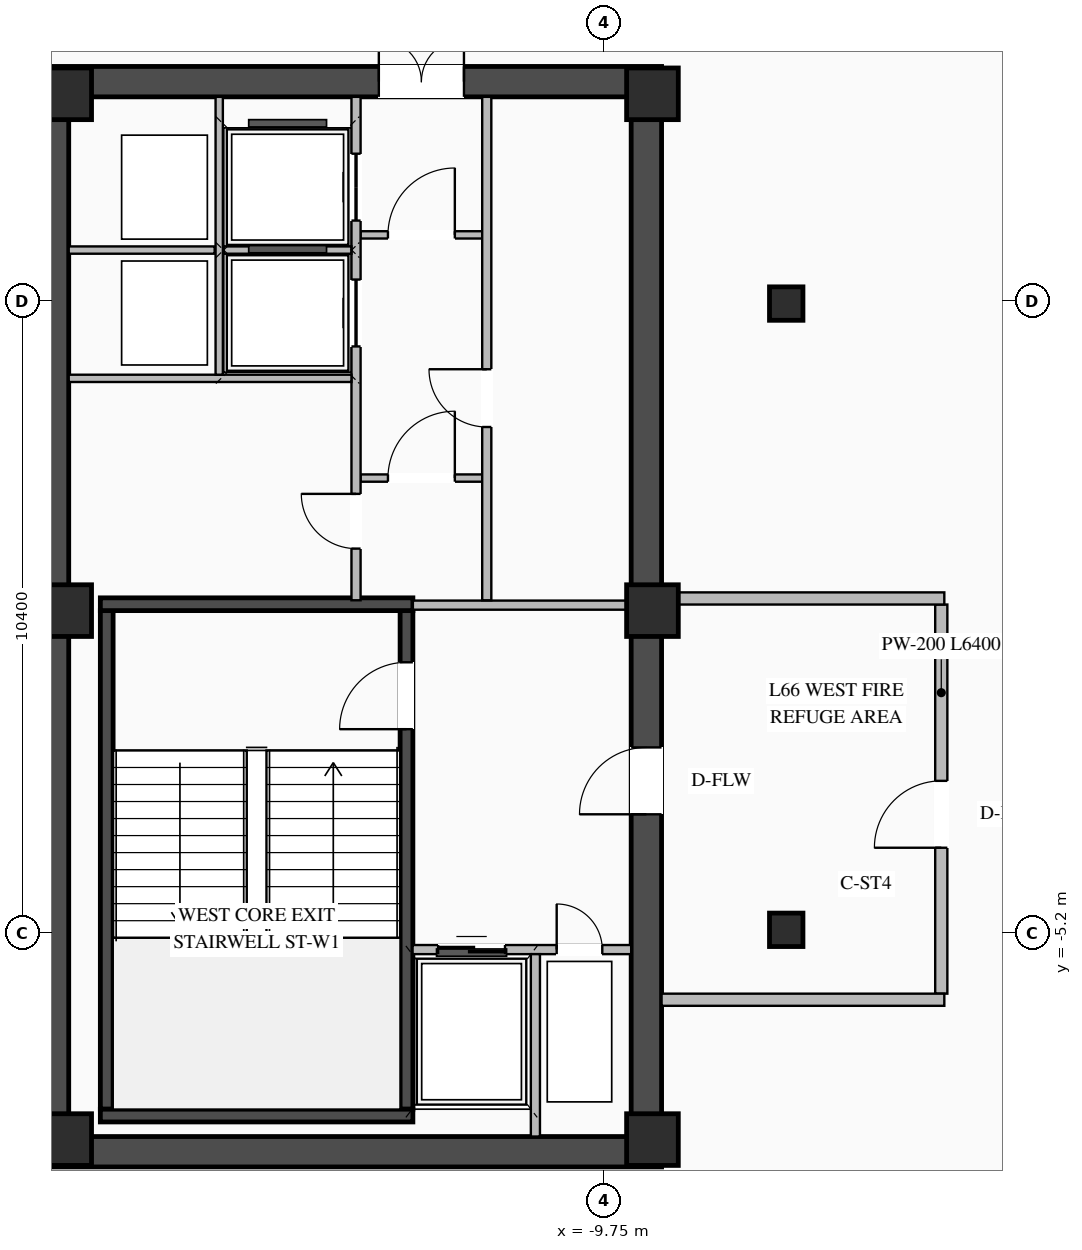
"""IFC4 building model, lengths in metres.
Left out: names, types, materials, properties, quantities, classifications, styles, units other than length and angle.
Written with IfcOpenShell. Run it as: python <this file> out.ifc"""

import sys

from ifc_helpers import new_model, si_unit, direction, frame, frame_2d, origin, origin_2d, place, context, subcontext, project, spatial, rectangle, i_section, extrude, element, fill, save


model = new_model("IFC4")
c1 = context("Model", 3, precision=1e-05, world=origin(), true_north=direction((0.0, 1.0)))
c2 = subcontext(c1, "Body", "Model", "MODEL_VIEW")
j1 = project(units=[si_unit("LENGTHUNIT", "METRE"), si_unit("PLANEANGLEUNIT", "RADIAN")], contexts=[c1])
p1 = place(None, origin())
s1 = spatial("IfcSite", under=j1, at=p1, CompositionType="ELEMENT")
p2 = place(p1, origin())
s2 = spatial("IfcBuilding", under=s1, at=p2, CompositionType="ELEMENT")
p3 = place(p2, frame((0.0, 0.0, 243.0)))
s3 = spatial("IfcBuildingStorey", under=s2, at=p3, CompositionType="ELEMENT", Elevation=243.0)
p4 = place(p3, frame((-19.05, -8.8, 0.0), z_axis=(0.0, 0.0, 1.0), x_axis=(1.0, 0.0, 0.0)))
e1 = element("IfcWall", 1, at=p4, inside=s3, PredefinedType="SHEAR", context=c2, shape_type="SweptSolid", body=[
    extrude(rectangle(XDim=10.25, YDim=0.5, at=frame_2d((5.125, 0.0))), origin(), (0.0, 0.0, 1.0), 4.22),
])
p5 = place(p3, frame((-19.05, 8.8, 0.0), z_axis=(0.0, 0.0, 1.0), x_axis=(1.0, 0.0, 0.0)))
e2 = element("IfcWall", 2, at=p5, inside=s3, PredefinedType="SHEAR", context=c2, shape_type="SweptSolid", body=[
    extrude(rectangle(XDim=10.25, YDim=0.5, at=frame_2d((5.125, 0.0))), origin(), (0.0, 0.0, 1.0), 4.22),
])
p6 = place(p5, frame((5.6, 0.0, 0.0)))
e3 = element("IfcOpeningElement", 3, at=p6, cuts=e2, PredefinedType="OPENING", context=c2, shape_type="SweptSolid", body=[
    extrude(rectangle(XDim=1.4, YDim=2.05, at=frame_2d((0.7, 1.025))), frame((0.0, 0.26, 0.0), z_axis=(0.0, -1.0, 0.0), x_axis=(1.0, 0.0, 0.0)), (0.0, 0.0, 1.0), 0.52),
])
p7 = place(p3, frame((-18.8, -8.55, 0.0), z_axis=(0.0, 0.0, 1.0), x_axis=(0.0, 1.0, 0.0)))
e4 = element("IfcWall", 4, at=p7, inside=s3, PredefinedType="SHEAR", context=c2, shape_type="SweptSolid", body=[
    extrude(rectangle(XDim=17.1, YDim=0.5, at=frame_2d((8.55, 0.0))), origin(), (0.0, 0.0, 1.0), 4.22),
])
p8 = place(p3, frame((-9.05, -8.55, 0.0), z_axis=(0.0, 0.0, 1.0), x_axis=(0.0, 1.0, 0.0)))
e5 = element("IfcWall", 5, at=p8, inside=s3, PredefinedType="SHEAR", context=c2, shape_type="SweptSolid", body=[
    extrude(rectangle(XDim=17.1, YDim=0.5, at=frame_2d((8.55, 0.0))), origin(), (0.0, 0.0, 1.0), 4.22),
])
p9 = place(p8, frame((5.3, 0.0, 0.0)))
e6 = element("IfcOpeningElement", 6, at=p9, cuts=e5, PredefinedType="OPENING", context=c2, shape_type="SweptSolid", body=[
    extrude(rectangle(XDim=1.1, YDim=2.08, at=frame_2d((0.55, 1.04))), frame((0.0, 0.26, 0.0), z_axis=(0.0, -1.0, 0.0), x_axis=(1.0, 0.0, 0.0)), (0.0, 0.0, 1.0), 0.52),
])
p10 = place(p3, frame((-12.995, -8.1, 0.0), z_axis=(0.0, 0.0, 1.0), x_axis=(0.0, 1.0, 0.0)))
e7 = element("IfcWall", 7, at=p10, inside=s3, PredefinedType="SHEAR", context=c2, shape_type="SweptSolid", body=[
    extrude(rectangle(XDim=8.2, YDim=0.21, at=frame_2d((4.1, 0.0))), origin(), (0.0, 0.0, 1.0), 4.22),
])
p11 = place(p10, frame((6.25, 0.0, 0.0)))
e8 = element("IfcOpeningElement", 8, at=p11, cuts=e7, PredefinedType="OPENING", context=c2, shape_type="SweptSolid", body=[
    extrude(rectangle(XDim=1.1, YDim=2.15, at=frame_2d((0.55, 1.075))), frame((0.0, 0.115, 0.0), z_axis=(0.0, -1.0, 0.0), x_axis=(1.0, 0.0, 0.0)), (0.0, 0.0, 1.0), 0.23),
])
p12 = place(p3, frame((-17.925, -8.1, 0.0), z_axis=(0.0, 0.0, 1.0), x_axis=(0.0, 1.0, 0.0)))
e9 = element("IfcWall", 9, at=p12, inside=s3, PredefinedType="SHEAR", context=c2, shape_type="SweptSolid", body=[
    extrude(rectangle(XDim=8.2, YDim=0.21, at=frame_2d((4.1, 0.0))), origin(), (0.0, 0.0, 1.0), 4.22),
])
for number, where, z_axis, x_axis in (
    (10, (-18.03, -8.205, 0.0), (0.0, 0.0, 1.0), (1.0, 0.0, 0.0)),
    (11, (-12.89, 0.205, 0.0), (0.0, 0.0, 1.0), (-1.0, 0.0, 0.0)),
):
    element("IfcWall", number, at=place(p3, frame(where, z_axis=z_axis, x_axis=x_axis)), inside=s3, PredefinedType="SHEAR", context=c2, shape_type="SweptSolid", body=[
        extrude(rectangle(XDim=5.14, YDim=0.21, at=frame_2d((2.57, 0.0))), origin(), (0.0, 0.0, 1.0), 4.22),
    ])
for number, where, z_axis, x_axis in (
    (12, (-8.95, -8.6, 0.0), (0.0, 0.0, 1.0), (1.0, 0.0, 0.0)),
    (13, (-8.95, 0.1, 0.0), (0.0, 0.0, 1.0), (1.0, 0.0, 0.0)),
    (14, (-8.95, 8.6, 0.0), (0.0, 0.0, 1.0), (1.0, 0.0, 0.0)),
    (15, (-18.6, -8.6, 0.0), (0.0, 0.0, 1.0), (1.0, 0.0, 0.0)),
    (16, (-18.6, 0.1, 0.0), (0.0, 0.0, 1.0), (1.0, 0.0, 0.0)),
    (17, (-18.6, 8.6, 0.0), (0.0, 0.0, 1.0), (1.0, 0.0, 0.0)),
):
    element("IfcColumn", number, at=place(p3, frame(where, z_axis=z_axis, x_axis=x_axis)), inside=s3, PredefinedType="COLUMN", context=c2, shape_type="SweptSolid", body=[
        extrude(rectangle(XDim=0.85, YDim=0.85, at=origin_2d()), origin(), (0.0, 0.0, 1.0), 4.5),
    ])
for number, where, z_axis, x_axis in (
    (18, (-6.75, -5.15, 0.0), (0.0, 0.0, 1.0), (1.0, 0.0, 0.0)),
    (19, (-6.75, 5.15, 0.0), (0.0, 0.0, 1.0), (1.0, 0.0, 0.0)),
):
    element("IfcColumn", number, at=place(p3, frame(where, z_axis=z_axis, x_axis=x_axis)), inside=s3, PredefinedType="COLUMN", context=c2, shape_type="SweptSolid", body=[
        extrude(i_section(OverallWidth=0.55, OverallDepth=0.55, WebThickness=0.024, FlangeThickness=0.036, at=origin_2d()), origin(), (0.0, 0.0, 1.0), 4.5),
    ])
p13 = place(p3, frame((-12.895, -5.475, 0.0), z_axis=(0.0, 0.0, 1.0), x_axis=(1.0, 0.0, 0.0)))
e20 = element("IfcWall", 20, at=p13, inside=s3, PredefinedType="STANDARD", context=c2, shape_type="SweptSolid", body=[
    extrude(rectangle(XDim=3.595, YDim=0.15, at=frame_2d((1.797, 0.0))), origin(), (0.0, 0.0, 1.0), 4.2),
])
p14 = place(p13, frame((0.42, 0.0, 0.0)))
e21 = element("IfcOpeningElement", 21, at=p14, cuts=e20, PredefinedType="OPENING", context=c2, shape_type="SweptSolid", body=[
    extrude(rectangle(XDim=1.1, YDim=2.15, at=frame_2d((0.55, 1.075))), frame((0.0, 0.085, 0.0), z_axis=(0.0, -1.0, 0.0), x_axis=(1.0, 0.0, 0.0)), (0.0, 0.0, 1.0), 0.17),
])
p15 = place(p13, frame((2.37, 0.0, 0.0)))
e22 = element("IfcOpeningElement", 22, at=p15, cuts=e20, PredefinedType="OPENING", context=c2, shape_type="SweptSolid", body=[
    extrude(rectangle(XDim=0.75, YDim=2.05, at=frame_2d((0.375, 1.025))), frame((0.0, 0.085, 0.0), z_axis=(0.0, -1.0, 0.0), x_axis=(1.0, 0.0, 0.0)), (0.0, 0.0, 1.0), 0.17),
])
p16 = place(p3, frame((-10.875, -8.55, 0.0), z_axis=(0.0, 0.0, 1.0), x_axis=(0.0, 1.0, 0.0)))
e23 = element("IfcWall", 23, at=p16, inside=s3, PredefinedType="STANDARD", context=c2, shape_type="SweptSolid", body=[
    extrude(rectangle(XDim=3.0, YDim=0.15, at=frame_2d((1.5, 0.0))), origin(), (0.0, 0.0, 1.0), 4.2),
])
p17 = place(p3, frame((-12.89, 0.19, 0.0), z_axis=(0.0, 0.0, 1.0), x_axis=(1.0, 0.0, 0.0)))
e24 = element("IfcWall", 24, at=p17, inside=s3, PredefinedType="STANDARD", context=c2, shape_type="SweptSolid", body=[
    extrude(rectangle(XDim=3.59, YDim=0.15, at=frame_2d((1.795, 0.0))), origin(), (0.0, 0.0, 1.0), 3.595),
])
p18 = place(p3, frame((-13.75, 2.28, 0.0), z_axis=(0.0, 0.0, 1.0), x_axis=(1.0, 0.0, 0.0)))
e25 = element("IfcWall", 25, at=p18, inside=s3, PredefinedType="STANDARD", context=c2, shape_type="SweptSolid", body=[
    extrude(rectangle(XDim=2.0, YDim=0.12, at=frame_2d((1.0, 0.0))), origin(), (0.0, 0.0, 1.0), 4.2),
])
p19 = place(p18, frame((0.45, 0.0, 0.0)))
e26 = element("IfcOpeningElement", 26, at=p19, cuts=e25, PredefinedType="OPENING", context=c2, shape_type="SweptSolid", body=[
    extrude(rectangle(XDim=1.1, YDim=2.1, at=frame_2d((0.55, 1.05))), frame((0.0, 0.07, 0.0), z_axis=(0.0, -1.0, 0.0), x_axis=(1.0, 0.0, 0.0)), (0.0, 0.0, 1.0), 0.14),
])
p20 = place(p3, frame((-13.75, 6.28, 0.0), z_axis=(0.0, 0.0, 1.0), x_axis=(1.0, 0.0, 0.0)))
e27 = element("IfcWall", 27, at=p20, inside=s3, PredefinedType="STANDARD", context=c2, shape_type="SweptSolid", body=[
    extrude(rectangle(XDim=2.0, YDim=0.12, at=frame_2d((1.0, 0.0))), origin(), (0.0, 0.0, 1.0), 4.2),
])
p21 = place(p20, frame((0.45, 0.0, 0.0)))
e28 = element("IfcOpeningElement", 28, at=p21, cuts=e27, PredefinedType="OPENING", context=c2, shape_type="SweptSolid", body=[
    extrude(rectangle(XDim=1.1, YDim=2.1, at=frame_2d((0.55, 1.05))), frame((0.0, 0.07, 0.0), z_axis=(0.0, -1.0, 0.0), x_axis=(1.0, 0.0, 0.0)), (0.0, 0.0, 1.0), 0.14),
])
p22 = place(p3, frame((-11.675, 0.27, 0.0), z_axis=(0.0, 0.0, 1.0), x_axis=(0.0, 1.0, 0.0)))
e29 = element("IfcWall", 29, at=p22, inside=s3, PredefinedType="STANDARD", context=c2, shape_type="SweptSolid", body=[
    extrude(rectangle(XDim=8.28, YDim=0.15, at=frame_2d((4.14, 0.0))), origin(), (0.0, 0.0, 1.0), 4.2),
])
p23 = place(p22, frame((2.85, 0.0, 0.0)))
e30 = element("IfcOpeningElement", 30, at=p23, cuts=e29, PredefinedType="OPENING", context=c2, shape_type="SweptSolid", body=[
    extrude(rectangle(XDim=0.95, YDim=2.05, at=frame_2d((0.475, 1.025))), frame((0.0, 0.085, 0.0), z_axis=(0.0, -1.0, 0.0), x_axis=(1.0, 0.0, 0.0)), (0.0, 0.0, 1.0), 0.17),
])
p24 = place(p3, frame((-13.825, 0.27, 0.0), z_axis=(0.0, 0.0, 1.0), x_axis=(0.0, 1.0, 0.0)))
e31 = element("IfcWall", 31, at=p24, inside=s3, PredefinedType="STANDARD", context=c2, shape_type="SweptSolid", body=[
    extrude(rectangle(XDim=8.28, YDim=0.15, at=frame_2d((4.14, 0.0))), origin(), (0.0, 0.0, 1.0), 4.2),
])
p25 = place(p24, frame((4.175, 0.0, 0.0)))
e32 = element("IfcOpeningElement", 32, at=p25, cuts=e31, PredefinedType="OPENING", context=c2, shape_type="SweptSolid", body=[
    extrude(rectangle(XDim=1.1, YDim=2.1, at=frame_2d((0.55, 1.05))), frame((0.0, 0.085, 0.0), z_axis=(0.0, -1.0, 0.0), x_axis=(1.0, 0.0, 0.0)), (0.0, 0.0, 1.0), 0.17),
])
p26 = place(p24, frame((6.245, 0.0, 0.0)))
e33 = element("IfcOpeningElement", 33, at=p26, cuts=e31, PredefinedType="OPENING", context=c2, shape_type="SweptSolid", body=[
    extrude(rectangle(XDim=1.1, YDim=2.1, at=frame_2d((0.55, 1.05))), frame((0.0, 0.085, 0.0), z_axis=(0.0, -1.0, 0.0), x_axis=(1.0, 0.0, 0.0)), (0.0, 0.0, 1.0), 0.17),
])
p27 = place(p24, frame((0.85, 0.0, 0.0)))
e34 = element("IfcOpeningElement", 34, at=p27, cuts=e31, PredefinedType="OPENING", context=c2, shape_type="SweptSolid", body=[
    extrude(rectangle(XDim=0.9, YDim=2.05, at=frame_2d((0.45, 1.025))), frame((0.0, 0.085, 0.0), z_axis=(0.0, -1.0, 0.0), x_axis=(1.0, 0.0, 0.0)), (0.0, 0.0, 1.0), 0.17),
])
p28 = place(p3, frame((-18.55, 3.92, 0.0), z_axis=(0.0, 0.0, 1.0), x_axis=(1.0, 0.0, 0.0)))
e35 = element("IfcWall", 35, at=p28, inside=s3, PredefinedType="STANDARD", context=c2, shape_type="SweptSolid", body=[
    extrude(rectangle(XDim=4.65, YDim=0.12, at=frame_2d((2.325, 0.0))), origin(), (0.0, 0.0, 1.0), 4.2),
])
p29 = place(p3, frame((-18.55, 6.03, 0.0), z_axis=(0.0, 0.0, 1.0), x_axis=(1.0, 0.0, 0.0)))
e36 = element("IfcWall", 36, at=p29, inside=s3, PredefinedType="STANDARD", context=c2, shape_type="SweptSolid", body=[
    extrude(rectangle(XDim=2.4, YDim=0.12, at=frame_2d((1.2, 0.0))), origin(), (0.0, 0.0, 1.0), 4.2),
])
p30 = place(p3, frame((-16.075, 3.98, 0.0), z_axis=(0.0, 0.0, 1.0), x_axis=(0.0, 1.0, 0.0)))
e37 = element("IfcWall", 37, at=p30, inside=s3, PredefinedType="STANDARD", context=c2, shape_type="SweptSolid", body=[
    extrude(rectangle(XDim=4.57, YDim=0.12, at=frame_2d((2.285, 0.0))), origin(), (0.0, 0.0, 1.0), 4.2),
])
p31 = place(p3, frame((-16.0, 6.03, 0.0), z_axis=(0.0, 0.0, 1.0), x_axis=(1.0, 0.0, 0.0)))
e38 = element("IfcWall", 38, at=p31, inside=s3, PredefinedType="STANDARD", context=c2, shape_type="SweptSolid", body=[
    extrude(rectangle(XDim=2.1, YDim=0.12, at=frame_2d((1.05, 0.0))), origin(), (0.0, 0.0, 1.0), 4.2),
])
p32 = place(p3, frame((-4.2, -6.2, 0.0), z_axis=(0.0, 0.0, 1.0), x_axis=(0.0, 1.0, 0.0)))
e39 = element("IfcWall", 39, at=p32, inside=s3, PredefinedType="STANDARD", context=c2, shape_type="SweptSolid", body=[
    extrude(rectangle(XDim=6.4, YDim=0.2, at=frame_2d((3.2, 0.0))), origin(), (0.0, 0.0, 1.0), 4.2),
])
p33 = place(p32, frame((2.4, 0.0, 0.0)))
e40 = element("IfcOpeningElement", 40, at=p33, cuts=e39, PredefinedType="OPENING", context=c2, shape_type="SweptSolid", body=[
    extrude(rectangle(XDim=1.1, YDim=2.08, at=frame_2d((0.55, 1.04))), frame((0.0, 0.11, 0.0), z_axis=(0.0, -1.0, 0.0), x_axis=(1.0, 0.0, 0.0)), (0.0, 0.0, 1.0), 0.22),
])
for number, where, z_axis, x_axis in (
    (41, (-8.8, -6.3, 0.0), (0.0, 0.0, 1.0), (1.0, 0.0, 0.0)),
    (42, (-8.8, 0.3, 0.0), (0.0, 0.0, 1.0), (1.0, 0.0, 0.0)),
):
    element("IfcWall", number, at=place(p3, frame(where, z_axis=z_axis, x_axis=x_axis)), inside=s3, PredefinedType="STANDARD", context=c2, shape_type="SweptSolid", body=[
        extrude(rectangle(XDim=4.65, YDim=0.2, at=frame_2d((2.325, 0.0))), origin(), (0.0, 0.0, 1.0), 4.2),
    ])
p34 = place(p11, origin())
e43 = element("IfcDoor", 43, at=p34, inside=s3, OperationType="SINGLE_SWING_LEFT", PredefinedType="DOOR", context=c2, shape_type="SweptSolid", body=[
    extrude(rectangle(XDim=1.1, YDim=2.15, at=frame_2d((0.55, 1.075))), frame((0.0, 0.025, 0.0), z_axis=(0.0, -1.0, 0.0), x_axis=(1.0, 0.0, 0.0)), (0.0, 0.0, 1.0), 0.05),
])
fill(e8, e43)
p35 = place(p14, origin())
e44 = element("IfcDoor", 44, at=p35, inside=s3, OperationType="DOUBLE_DOOR_SLIDING", PredefinedType="DOOR", context=c2, shape_type="SweptSolid", body=[
    extrude(rectangle(XDim=1.1, YDim=2.15, at=frame_2d((0.55, 1.075))), frame((0.0, 0.025, 0.0), z_axis=(0.0, -1.0, 0.0), x_axis=(1.0, 0.0, 0.0)), (0.0, 0.0, 1.0), 0.05),
])
fill(e21, e44)
p36 = place(p15, origin())
e45 = element("IfcDoor", 45, at=p36, inside=s3, OperationType="SINGLE_SWING_LEFT", PredefinedType="DOOR", context=c2, shape_type="SweptSolid", body=[
    extrude(rectangle(XDim=0.75, YDim=2.05, at=frame_2d((0.375, 1.025))), frame((0.0, 0.025, 0.0), z_axis=(0.0, -1.0, 0.0), x_axis=(1.0, 0.0, 0.0)), (0.0, 0.0, 1.0), 0.05),
])
fill(e22, e45)
p37 = place(p9, origin())
e46 = element("IfcDoor", 46, at=p37, inside=s3, OperationType="SINGLE_SWING_LEFT", PredefinedType="DOOR", context=c2, shape_type="SweptSolid", body=[
    extrude(rectangle(XDim=1.1, YDim=2.08, at=frame_2d((0.55, 1.04))), frame((0.0, 0.205, 0.0), z_axis=(0.0, -1.0, 0.0), x_axis=(1.0, 0.0, 0.0)), (0.0, 0.0, 1.0), 0.05),
])
fill(e6, e46)
p38 = place(p19, origin())
e47 = element("IfcDoor", 47, at=p38, inside=s3, OperationType="SINGLE_SWING_RIGHT", PredefinedType="DOOR", context=c2, shape_type="SweptSolid", body=[
    extrude(rectangle(XDim=1.1, YDim=2.1, at=frame_2d((0.55, 1.05))), frame((0.0, 0.025, 0.0), z_axis=(0.0, -1.0, 0.0), x_axis=(1.0, 0.0, 0.0)), (0.0, 0.0, 1.0), 0.05),
])
fill(e26, e47)
p39 = place(p21, origin())
e48 = element("IfcDoor", 48, at=p39, inside=s3, OperationType="SINGLE_SWING_RIGHT", PredefinedType="DOOR", context=c2, shape_type="SweptSolid", body=[
    extrude(rectangle(XDim=1.1, YDim=2.1, at=frame_2d((0.55, 1.05))), frame((0.0, 0.025, 0.0), z_axis=(0.0, -1.0, 0.0), x_axis=(1.0, 0.0, 0.0)), (0.0, 0.0, 1.0), 0.05),
])
fill(e28, e48)
p40 = place(p6, origin())
e49 = element("IfcDoor", 49, at=p40, inside=s3, OperationType="DOUBLE_DOOR_SINGLE_SWING", PredefinedType="DOOR", context=c2, shape_type="SweptSolid", body=[
    extrude(rectangle(XDim=1.4, YDim=2.05, at=frame_2d((0.7, 1.025))), frame((0.0, 0.195, 0.0), z_axis=(0.0, -1.0, 0.0), x_axis=(1.0, 0.0, 0.0)), (0.0, 0.0, 1.0), 0.05),
])
fill(e3, e49)
p41 = place(p23, origin())
e50 = element("IfcDoor", 50, at=p41, inside=s3, OperationType="SINGLE_SWING_RIGHT", PredefinedType="DOOR", context=c2, shape_type="SweptSolid", body=[
    extrude(rectangle(XDim=0.95, YDim=2.05, at=frame_2d((0.475, 1.025))), frame((0.0, 0.025, 0.0), z_axis=(0.0, -1.0, 0.0), x_axis=(1.0, 0.0, 0.0)), (0.0, 0.0, 1.0), 0.05),
])
fill(e30, e50)
p42 = place(p25, origin())
e51 = element("IfcDoor", 51, at=p42, inside=s3, OperationType="DOUBLE_DOOR_SLIDING", PredefinedType="DOOR", context=c2, shape_type="SweptSolid", body=[
    extrude(rectangle(XDim=1.1, YDim=2.1, at=frame_2d((0.55, 1.05))), frame((0.0, 0.025, 0.0), z_axis=(0.0, -1.0, 0.0), x_axis=(1.0, 0.0, 0.0)), (0.0, 0.0, 1.0), 0.05),
])
fill(e32, e51)
p43 = place(p26, origin())
e52 = element("IfcDoor", 52, at=p43, inside=s3, OperationType="DOUBLE_DOOR_SLIDING", PredefinedType="DOOR", context=c2, shape_type="SweptSolid", body=[
    extrude(rectangle(XDim=1.1, YDim=2.1, at=frame_2d((0.55, 1.05))), frame((0.0, 0.025, 0.0), z_axis=(0.0, -1.0, 0.0), x_axis=(1.0, 0.0, 0.0)), (0.0, 0.0, 1.0), 0.05),
])
fill(e33, e52)
p44 = place(p27, origin())
e53 = element("IfcDoor", 53, at=p44, inside=s3, OperationType="SINGLE_SWING_RIGHT", PredefinedType="DOOR", context=c2, shape_type="SweptSolid", body=[
    extrude(rectangle(XDim=0.9, YDim=2.05, at=frame_2d((0.45, 1.025))), frame((0.0, 0.025, 0.0), z_axis=(0.0, -1.0, 0.0), x_axis=(1.0, 0.0, 0.0)), (0.0, 0.0, 1.0), 0.05),
])
fill(e34, e53)
p45 = place(p33, origin())
e54 = element("IfcDoor", 54, at=p45, inside=s3, OperationType="SINGLE_SWING_LEFT", PredefinedType="DOOR", context=c2, shape_type="SweptSolid", body=[
    extrude(rectangle(XDim=1.1, YDim=2.08, at=frame_2d((0.55, 1.04))), frame((0.0, 0.025, 0.0), z_axis=(0.0, -1.0, 0.0), x_axis=(1.0, 0.0, 0.0)), (0.0, 0.0, 1.0), 0.05),
])
fill(e40, e54)
save(model, sys.argv[1])
